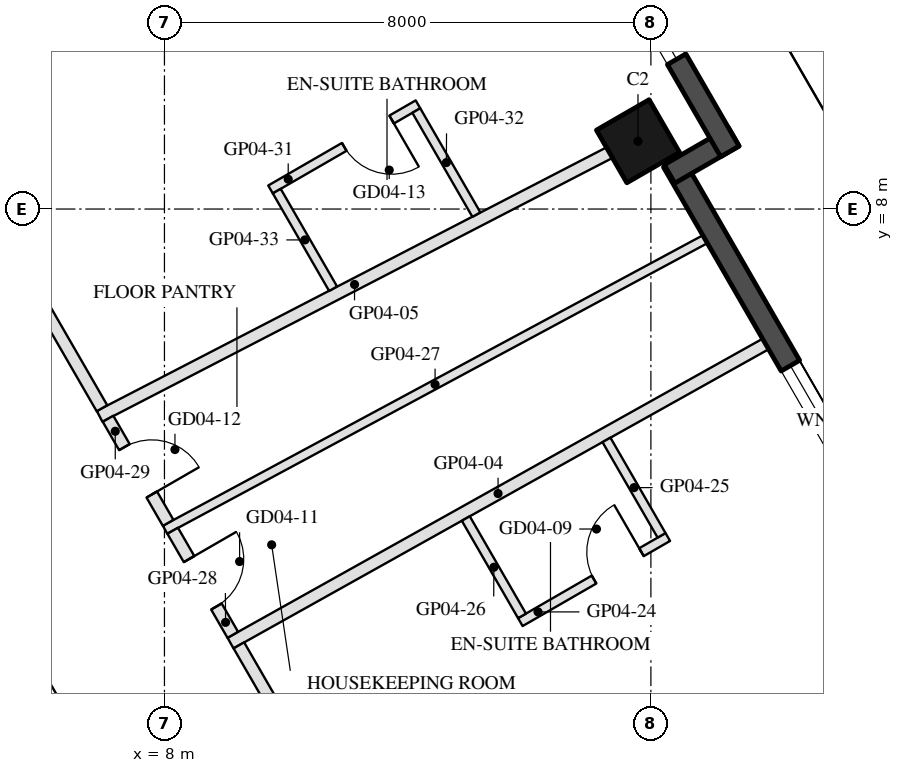
"""IFC4 building model, lengths in metres.
Left out: names, types, materials, properties, quantities, classifications, styles, units other than length and angle.
Written with IfcOpenShell. Run it as: python <this file> out.ifc"""

import sys

from ifc_helpers import new_model, si_unit, direction, frame, frame_2d, origin, origin_2d, place, context, subcontext, project, spatial, rectangle, hollow_rectangle, extrude, element, fill, save


model = new_model("IFC4")
c1 = context("Model", 3, precision=1e-05, world=origin(), true_north=direction((0.0, 1.0)))
c2 = subcontext(c1, "Body", "Model", "MODEL_VIEW")
j1 = project(units=[si_unit("LENGTHUNIT", "METRE"), si_unit("PLANEANGLEUNIT", "RADIAN")], contexts=[c1])
p1 = place(None, origin())
s1 = spatial("IfcSite", under=j1, at=p1, CompositionType="ELEMENT")
p2 = place(p1, origin())
s2 = spatial("IfcBuilding", under=s1, at=p2, CompositionType="ELEMENT")
p3 = place(p2, frame((0.0, 0.0, 76.1)))
s3 = spatial("IfcBuildingStorey", under=s2, at=p3, CompositionType="ELEMENT", Elevation=76.1)
p4 = place(p3, frame((15.788, 9.115, 0.0), z_axis=(0.0, 0.0, 1.0), x_axis=(-0.5, 0.866025403784, 0.0)))
e1 = element("IfcColumn", 1, at=p4, inside=s3, PredefinedType="COLUMN", context=c2, shape_type="SweptSolid", body=[
    extrude(hollow_rectangle(XDim=1.0, YDim=1.0, WallThickness=0.045, at=origin_2d()), origin(), (0.0, 0.0, 1.0), 3.7),
])
p5 = place(p3, frame((19.729, 2.938, 0.0), z_axis=(0.0, 0.0, 1.0), x_axis=(-0.499976430342, 0.866039011305, 0.0)))
e2 = element("IfcWall", 2, at=p5, inside=s3, PredefinedType="SOLIDWALL", context=c2, shape_type="SweptSolid", body=[
    extrude(rectangle(XDim=6.74, YDim=0.35, at=frame_2d((3.37, 0.0))), origin(), (0.0, 0.0, 1.0), 3.55),
])
p6 = place(p5, frame((0.77, 0.0, 0.3)))
e3 = element("IfcOpeningElement", 3, at=p6, cuts=e2, PredefinedType="OPENING", context=c2, shape_type="SweptSolid", body=[
    extrude(rectangle(XDim=2.1, YDim=2.65, at=frame_2d((1.05, 1.325))), frame((0.0, 0.185, 0.0), z_axis=(0.0, -1.0, 0.0), x_axis=(1.0, 0.0, 0.0)), (0.0, 0.0, 1.0), 0.37),
])
p7 = place(p3, frame((16.306, 8.577, 0.0), z_axis=(0.0, 0.0, 1.0), x_axis=(0.866092288191, 0.499884134912, 0.0)))
e4 = element("IfcWall", 4, at=p7, inside=s3, PredefinedType="SOLIDWALL", context=c2, shape_type="SweptSolid", body=[
    extrude(rectangle(XDim=1.22, YDim=0.35, at=frame_2d((0.61, 0.0))), origin(), (0.0, 0.0, 1.0), 3.55),
])
p8 = place(p3, frame((17.299, 8.948, 0.0), z_axis=(0.0, 0.0, 1.0), x_axis=(-0.500010041276, 0.866019606374, 0.0)))
e5 = element("IfcWall", 5, at=p8, inside=s3, PredefinedType="SOLIDWALL", context=c2, shape_type="SweptSolid", body=[
    extrude(rectangle(XDim=9.7, YDim=0.35, at=frame_2d((4.85, 0.0))), origin(), (0.0, 0.0, 1.0), 3.55),
])
p9 = place(p8, frame((1.75, 0.0, 0.3)))
e6 = element("IfcOpeningElement", 6, at=p9, cuts=e5, PredefinedType="OPENING", context=c2, shape_type="SweptSolid", body=[
    extrude(rectangle(XDim=2.4, YDim=2.65, at=frame_2d((1.2, 1.325))), frame((0.0, 0.185, 0.0), z_axis=(0.0, -1.0, 0.0), x_axis=(1.0, 0.0, 0.0)), (0.0, 0.0, 1.0), 0.37),
])
p10 = place(p8, frame((4.949, 0.0, 0.3)))
e7 = element("IfcOpeningElement", 7, at=p10, cuts=e5, PredefinedType="OPENING", context=c2, shape_type="SweptSolid", body=[
    extrude(rectangle(XDim=3.0, YDim=2.65, at=frame_2d((1.5, 1.325))), frame((0.0, 0.185, 0.0), z_axis=(0.0, -1.0, 0.0), x_axis=(1.0, 0.0, 0.0)), (0.0, 0.0, 1.0), 0.37),
])
p11 = place(p3, frame((17.886, 5.78, 0.0), z_axis=(0.0, 0.0, 1.0), x_axis=(-0.872898889426, -0.487901146585, 0.0)))
e8 = element("IfcWall", 8, at=p11, inside=s3, PredefinedType="PARTITIONING", context=c2, shape_type="SweptSolid", body=[
    extrude(rectangle(XDim=10.081, YDim=0.2, at=frame_2d((5.041, 0.0))), origin(), (0.0, 0.0, 1.0), 2.95),
])
p12 = place(p3, frame((15.319, 8.927, 0.0), z_axis=(0.0, 0.0, 1.0), x_axis=(-0.888261672675, -0.459337785139, 0.0)))
e9 = element("IfcWall", 9, at=p12, inside=s3, PredefinedType="PARTITIONING", context=c2, shape_type="SweptSolid", body=[
    extrude(rectangle(XDim=9.44, YDim=0.2, at=frame_2d((4.72, 0.0))), origin(), (0.0, 0.0, 1.0), 2.95),
])
p13 = place(p3, frame((9.224, 0.824, 0.0), z_axis=(0.0, 0.0, 1.0), x_axis=(0.500019749946, -0.866014000848, 0.0)))
e10 = element("IfcWall", 10, at=p13, inside=s3, PredefinedType="PARTITIONING", context=c2, shape_type="SweptSolid", body=[
    extrude(rectangle(XDim=6.09, YDim=0.2, at=frame_2d((3.045, 0.0))), origin(), (0.0, 0.0, 1.0), 2.95),
])
p14 = place(p13, frame((2.545, 0.0, 0.0)))
e11 = element("IfcOpeningElement", 11, at=p14, cuts=e10, PredefinedType="OPENING", context=c2, shape_type="SweptSolid", body=[
    extrude(rectangle(XDim=1.0, YDim=2.1, at=frame_2d((0.5, 1.05))), frame((0.0, 0.11, 0.0), z_axis=(0.0, -1.0, 0.0), x_axis=(1.0, 0.0, 0.0)), (0.0, 0.0, 1.0), 0.22),
])
p15 = place(p3, frame((13.853, 1.206, 0.0), z_axis=(0.0, 0.0, 1.0), x_axis=(0.866056369097, 0.49994636267, 0.0)))
e12 = element("IfcWall", 12, at=p15, inside=s3, PredefinedType="PARTITIONING", context=c2, shape_type="SweptSolid", body=[
    extrude(rectangle(XDim=2.8, YDim=0.15, at=frame_2d((1.4, 0.0))), origin(), (0.0, 0.0, 1.0), 3.55),
])
p16 = place(p15, frame((1.4, 0.0, 0.0)))
e13 = element("IfcOpeningElement", 13, at=p16, cuts=e12, PredefinedType="OPENING", context=c2, shape_type="SweptSolid", body=[
    extrude(rectangle(XDim=0.9, YDim=2.1, at=frame_2d((0.45, 1.05))), frame((0.0, 0.085, 0.0), z_axis=(0.0, -1.0, 0.0), x_axis=(1.0, 0.0, 0.0)), (0.0, 0.0, 1.0), 0.17),
])
p17 = place(p3, frame((16.175, 2.633, 0.0), z_axis=(0.0, 0.0, 1.0), x_axis=(-0.499979029598, 0.866037510713, 0.0)))
e14 = element("IfcWall", 14, at=p17, inside=s3, PredefinedType="PARTITIONING", context=c2, shape_type="SweptSolid", body=[
    extrude(rectangle(XDim=1.812, YDim=0.15, at=frame_2d((0.906, 0.0))), origin(), (0.0, 0.0, 1.0), 2.95),
])
p18 = place(p3, frame((13.88, 1.308, 0.0), z_axis=(0.0, 0.0, 1.0), x_axis=(-0.500015802937, 0.866016279763, 0.0)))
e15 = element("IfcWall", 15, at=p18, inside=s3, PredefinedType="PARTITIONING", context=c2, shape_type="SweptSolid", body=[
    extrude(rectangle(XDim=1.849, YDim=0.15, at=frame_2d((0.925, 0.0))), origin(), (0.0, 0.0, 1.0), 2.95),
])
p19 = place(p3, frame((16.892, 7.503, 0.0), z_axis=(0.0, 0.0, 1.0), x_axis=(-0.88070031641, -0.473673888531, 0.0)))
e16 = element("IfcWall", 16, at=p19, inside=s3, PredefinedType="PARTITIONING", context=c2, shape_type="SweptSolid", body=[
    extrude(rectangle(XDim=10.085, YDim=0.15, at=frame_2d((5.042, 0.0))), origin(), (0.0, 0.0, 1.0), 2.96),
])
p20 = place(p3, frame((8.135, 2.709, 0.0), z_axis=(0.0, 0.0, 1.0), x_axis=(0.499964791386, -0.866045730533, 0.0)))
e17 = element("IfcWall", 17, at=p20, inside=s3, PredefinedType="PARTITIONING", context=c2, shape_type="SweptSolid", body=[
    extrude(rectangle(XDim=1.977, YDim=0.2, at=frame_2d((0.988, 0.0))), origin(), (0.0, 0.0, 1.0), 3.55),
])
p21 = place(p20, frame((0.538, 0.0, 0.0)))
e18 = element("IfcOpeningElement", 18, at=p21, cuts=e17, PredefinedType="OPENING", context=c2, shape_type="SweptSolid", body=[
    extrude(rectangle(XDim=0.9, YDim=2.1, at=frame_2d((0.45, 1.05))), frame((0.0, 0.11, 0.0), z_axis=(0.0, -1.0, 0.0), x_axis=(1.0, 0.0, 0.0)), (0.0, 0.0, 1.0), 0.22),
])
p22 = place(p3, frame((7.072, 4.55, 0.0), z_axis=(0.0, 0.0, 1.0), x_axis=(0.500018274647, -0.866014852655, 0.0)))
e19 = element("IfcWall", 19, at=p22, inside=s3, PredefinedType="PARTITIONING", context=c2, shape_type="SweptSolid", body=[
    extrude(rectangle(XDim=1.977, YDim=0.2, at=frame_2d((0.988, 0.0))), origin(), (0.0, 0.0, 1.0), 2.95),
])
p23 = place(p22, frame((0.538, 0.0, 0.0)))
e20 = element("IfcOpeningElement", 20, at=p23, cuts=e19, PredefinedType="OPENING", context=c2, shape_type="SweptSolid", body=[
    extrude(rectangle(XDim=0.9, YDim=2.1, at=frame_2d((0.45, 1.05))), frame((0.0, 0.11, 0.0), z_axis=(0.0, -1.0, 0.0), x_axis=(1.0, 0.0, 0.0)), (0.0, 0.0, 1.0), 0.22),
])
p24 = place(p3, frame((2.281, 12.85, 0.0), z_axis=(0.0, 0.0, 1.0), x_axis=(0.499986710104, -0.866033076574, 0.0)))
e21 = element("IfcWall", 21, at=p24, inside=s3, PredefinedType="PARTITIONING", context=c2, shape_type="SweptSolid", body=[
    extrude(rectangle(XDim=9.384, YDim=0.2, at=frame_2d((4.692, 0.0))), origin(), (0.0, 0.0, 1.0), 2.95),
])
p25 = place(p24, frame((4.192, 0.0, 0.0)))
e22 = element("IfcOpeningElement", 22, at=p25, cuts=e21, PredefinedType="OPENING", context=c2, shape_type="SweptSolid", body=[
    extrude(rectangle(XDim=1.0, YDim=2.1, at=frame_2d((0.5, 1.05))), frame((0.0, 0.11, 0.0), z_axis=(0.0, -1.0, 0.0), x_axis=(1.0, 0.0, 0.0)), (0.0, 0.0, 1.0), 0.22),
])
p26 = place(p3, frame((12.169, 9.722, 0.0), z_axis=(0.0, 0.0, 1.0), x_axis=(-0.865996816683, -0.500049511043, 0.0)))
e23 = element("IfcWall", 23, at=p26, inside=s3, PredefinedType="PARTITIONING", context=c2, shape_type="SweptSolid", body=[
    extrude(rectangle(XDim=2.8, YDim=0.15, at=frame_2d((1.4, 0.0))), origin(), (0.0, 0.0, 1.0), 3.55),
])
p27 = place(p26, frame((0.5, 0.0, 0.0)))
e24 = element("IfcOpeningElement", 24, at=p27, cuts=e23, PredefinedType="OPENING", context=c2, shape_type="SweptSolid", body=[
    extrude(rectangle(XDim=0.9, YDim=2.1, at=frame_2d((0.45, 1.05))), frame((0.0, 0.085, 0.0), z_axis=(0.0, -1.0, 0.0), x_axis=(1.0, 0.0, 0.0)), (0.0, 0.0, 1.0), 0.17),
])
p28 = place(p3, frame((13.13, 7.908, 0.0), z_axis=(0.0, 0.0, 1.0), x_axis=(-0.500071767444, 0.865983964866, 0.0)))
e25 = element("IfcWall", 25, at=p28, inside=s3, PredefinedType="PARTITIONING", context=c2, shape_type="SweptSolid", body=[
    extrude(rectangle(XDim=1.976, YDim=0.15, at=frame_2d((0.988, 0.0))), origin(), (0.0, 0.0, 1.0), 3.55),
])
p29 = place(p3, frame((10.774, 6.689, 0.0), z_axis=(0.0, 0.0, 1.0), x_axis=(-0.499992292652, 0.866029853578, 0.0)))
e26 = element("IfcWall", 26, at=p29, inside=s3, PredefinedType="PARTITIONING", context=c2, shape_type="SweptSolid", body=[
    extrude(rectangle(XDim=1.854, YDim=0.15, at=frame_2d((0.927, 0.0))), origin(), (0.0, 0.0, 1.0), 3.55),
])
p30 = place(p6, origin())
e27 = element("IfcWindow", 27, at=p30, inside=s3, PartitioningType="SINGLE_PANEL", PredefinedType="WINDOW", context=c2, shape_type="SweptSolid", body=[
    extrude(rectangle(XDim=2.1, YDim=2.65, at=frame_2d((1.05, 1.325))), frame((0.0, 0.03, 0.0), z_axis=(0.0, -1.0, 0.0), x_axis=(1.0, 0.0, 0.0)), (0.0, 0.0, 1.0), 0.06),
])
fill(e3, e27)
p31 = place(p9, origin())
e28 = element("IfcWindow", 28, at=p31, inside=s3, PartitioningType="SINGLE_PANEL", PredefinedType="WINDOW", context=c2, shape_type="SweptSolid", body=[
    extrude(rectangle(XDim=2.4, YDim=2.65, at=frame_2d((1.2, 1.325))), frame((0.0, 0.03, 0.0), z_axis=(0.0, -1.0, 0.0), x_axis=(1.0, 0.0, 0.0)), (0.0, 0.0, 1.0), 0.06),
])
fill(e6, e28)
p32 = place(p16, origin())
e29 = element("IfcDoor", 29, at=p32, inside=s3, OperationType="SINGLE_SWING_RIGHT", PredefinedType="DOOR", context=c2, shape_type="SweptSolid", body=[
    extrude(rectangle(XDim=0.9, YDim=2.1, at=frame_2d((0.45, 1.05))), frame((0.0, 0.025, 0.0), z_axis=(0.0, -1.0, 0.0), x_axis=(1.0, 0.0, 0.0)), (0.0, 0.0, 1.0), 0.05),
])
fill(e13, e29)
p33 = place(p21, origin())
e30 = element("IfcDoor", 30, at=p33, inside=s3, OperationType="SINGLE_SWING_LEFT", PredefinedType="DOOR", context=c2, shape_type="SweptSolid", body=[
    extrude(rectangle(XDim=0.9, YDim=2.1, at=frame_2d((0.45, 1.05))), frame((0.0, 0.025, 0.0), z_axis=(0.0, -1.0, 0.0), x_axis=(1.0, 0.0, 0.0)), (0.0, 0.0, 1.0), 0.05),
])
fill(e18, e30)
p34 = place(p23, origin())
e31 = element("IfcDoor", 31, at=p34, inside=s3, OperationType="SINGLE_SWING_RIGHT", PredefinedType="DOOR", context=c2, shape_type="SweptSolid", body=[
    extrude(rectangle(XDim=0.9, YDim=2.1, at=frame_2d((0.45, 1.05))), frame((0.0, 0.025, 0.0), z_axis=(0.0, -1.0, 0.0), x_axis=(1.0, 0.0, 0.0)), (0.0, 0.0, 1.0), 0.05),
])
fill(e20, e31)
p35 = place(p27, origin())
e32 = element("IfcDoor", 32, at=p35, inside=s3, OperationType="SINGLE_SWING_LEFT", PredefinedType="DOOR", context=c2, shape_type="SweptSolid", body=[
    extrude(rectangle(XDim=0.9, YDim=2.1, at=frame_2d((0.45, 1.05))), frame((0.0, 0.025, 0.0), z_axis=(0.0, -1.0, 0.0), x_axis=(1.0, 0.0, 0.0)), (0.0, 0.0, 1.0), 0.05),
])
fill(e24, e32)
save(model, sys.argv[1])
